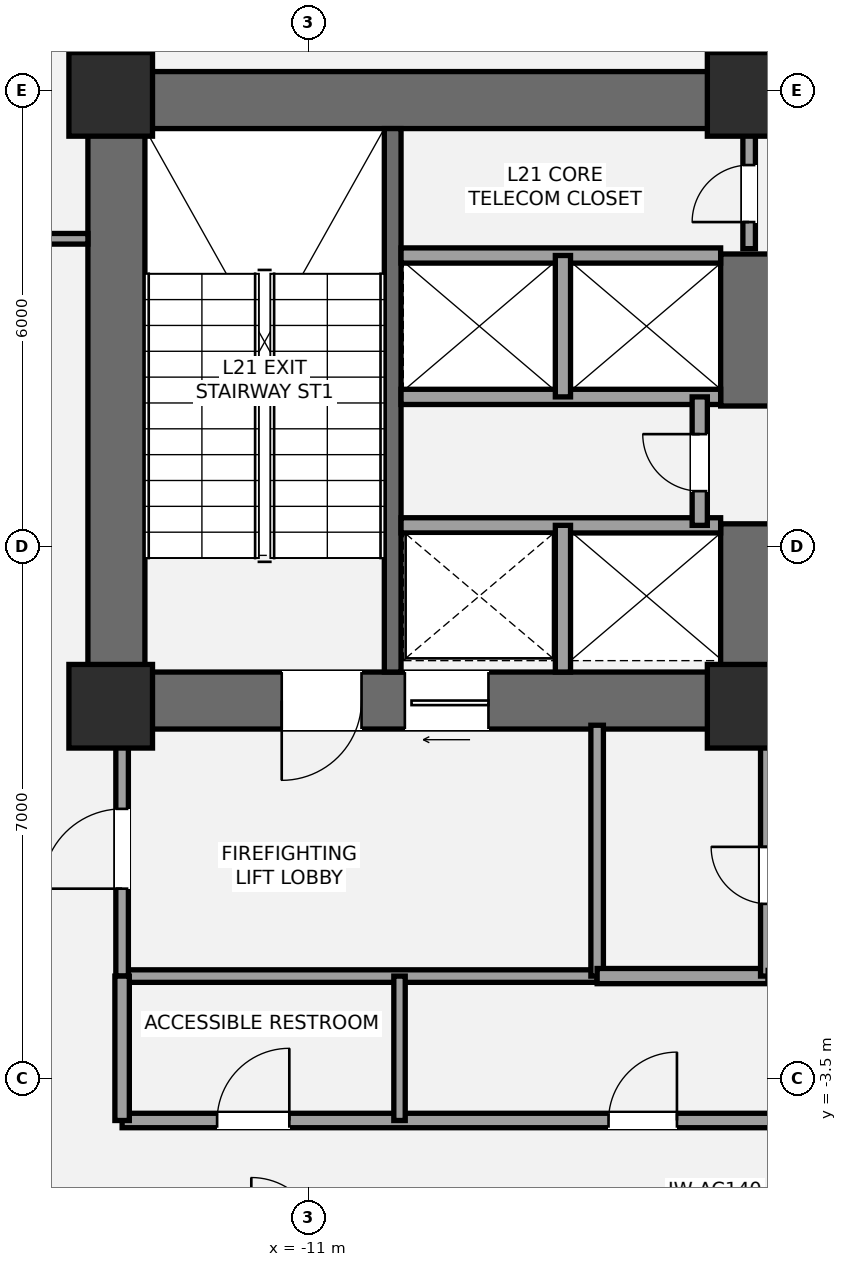
"""IFC4 building model, lengths in metres.
Left out: names, types, materials, properties, quantities, classifications, styles, units other than length and angle.
Written with IfcOpenShell. Run it as: python <this file> out.ifc"""

import sys

from ifc_helpers import new_model, si_unit, direction, frame, frame_2d, origin, origin_2d, place, context, subcontext, project, spatial, rectangle, extrude, element, fill, save


model = new_model("IFC4")
c1 = context("Model", 3, precision=1e-05, world=origin(), true_north=direction((0.0, 1.0)))
c2 = subcontext(c1, "Body", "Model", "MODEL_VIEW")
j1 = project(units=[si_unit("LENGTHUNIT", "METRE"), si_unit("PLANEANGLEUNIT", "RADIAN")], contexts=[c1])
p1 = place(None, origin())
s1 = spatial("IfcSite", under=j1, at=p1, CompositionType="ELEMENT")
p2 = place(p1, origin())
s2 = spatial("IfcBuilding", under=s1, at=p2, CompositionType="ELEMENT")
p3 = place(p2, frame((0.0, 0.0, 81.9)))
s3 = spatial("IfcBuildingStorey", under=s2, at=p3, CompositionType="ELEMENT", Elevation=81.9)
p4 = place(p3, frame((-13.525, 1.1, 0.0), z_axis=(0.0, 0.0, 1.0), x_axis=(0.0, 1.0, 0.0)))
e1 = element("IfcWall", 1, at=p4, inside=s3, PredefinedType="SHEAR", context=c2, shape_type="SweptSolid", body=[
    extrude(rectangle(XDim=8.65, YDim=0.75, at=frame_2d((4.325, 0.0))), origin(), (0.0, 0.0, 1.0), 4.2),
])
p5 = place(p3, frame((-13.9, 9.375, 0.0), z_axis=(0.0, 0.0, 1.0), x_axis=(1.0, 0.0, 0.0)))
e2 = element("IfcWall", 2, at=p5, inside=s3, PredefinedType="SHEAR", context=c2, shape_type="SweptSolid", body=[
    extrude(rectangle(XDim=9.475, YDim=0.75, at=frame_2d((4.737, 0.0))), origin(), (0.0, 0.0, 1.0), 4.2),
])
p6 = place(p3, frame((-4.825, 1.475, 0.0), z_axis=(0.0, 0.0, 1.0), x_axis=(-1.0, 0.0, 0.0)))
e3 = element("IfcWall", 3, at=p6, inside=s3, PredefinedType="SHEAR", context=c2, shape_type="SweptSolid", body=[
    extrude(rectangle(XDim=9.075, YDim=0.75, at=frame_2d((4.538, 0.0))), origin(), (0.0, 0.0, 1.0), 4.2),
])
p7 = place(p6, frame((5.475, 0.0, 0.0)))
e4 = element("IfcOpeningElement", 4, at=p7, cuts=e3, PredefinedType="OPENING", context=c2, shape_type="SweptSolid", body=[
    extrude(rectangle(XDim=1.05, YDim=2.15, at=frame_2d((0.525, 1.075))), frame((0.0, 0.385, 0.0), z_axis=(0.0, -1.0, 0.0), x_axis=(1.0, 0.0, 0.0)), (0.0, 0.0, 1.0), 0.77),
])
p8 = place(p6, frame((3.805, 0.0, 0.0)))
e5 = element("IfcOpeningElement", 5, at=p8, cuts=e3, PredefinedType="OPENING", context=c2, shape_type="SweptSolid", body=[
    extrude(rectangle(XDim=1.1, YDim=2.2, at=frame_2d((0.55, 1.1))), frame((0.0, 0.385, 0.0), z_axis=(0.0, -1.0, 0.0), x_axis=(1.0, 0.0, 0.0)), (0.0, 0.0, 1.0), 0.77),
])
p9 = place(p3, frame((-5.2, 1.1, 0.0), z_axis=(0.0, 0.0, 1.0), x_axis=(0.0, 1.0, 0.0)))
e6 = element("IfcWall", 6, at=p9, inside=s3, PredefinedType="SHEAR", context=c2, shape_type="SweptSolid", body=[
    extrude(rectangle(XDim=2.7, YDim=0.75, at=frame_2d((1.35, 0.0))), origin(), (0.0, 0.0, 1.0), 4.2),
])
p10 = place(p3, frame((-5.2, 5.35, 0.0), z_axis=(0.0, 0.0, 1.0), x_axis=(0.0, 1.0, 0.0)))
e7 = element("IfcWall", 7, at=p10, inside=s3, PredefinedType="SHEAR", context=c2, shape_type="SweptSolid", body=[
    extrude(rectangle(XDim=2.0, YDim=0.75, at=frame_2d((1.0, 0.0))), origin(), (0.0, 0.0, 1.0), 4.2),
])
p11 = place(p3, frame((-9.89, 1.85, 0.0), z_axis=(0.0, 0.0, 1.0), x_axis=(0.0, 1.0, 0.0)))
e8 = element("IfcWall", 8, at=p11, inside=s3, PredefinedType="SHEAR", context=c2, shape_type="SweptSolid", body=[
    extrude(rectangle(XDim=7.15, YDim=0.22, at=frame_2d((3.575, 0.0))), origin(), (0.0, 0.0, 1.0), 4.2),
])
p12 = place(p3, frame((-4.8, 9.0, 0.0), z_axis=(0.0, 0.0, 1.0), x_axis=(0.0, 1.0, 0.0)))
e9 = element("IfcWall", 9, at=p12, inside=s3, PredefinedType="SHEAR", context=c2, shape_type="SweptSolid", body=[
    extrude(rectangle(XDim=4.15, YDim=0.75, at=frame_2d((2.075, 0.0))), origin(), (0.0, 0.0, 1.0), 4.2),
])
for number, where, z_axis, x_axis in (
    (10, (-13.6, 1.4, 0.0), (0.0, 0.0, 1.0), (1.0, 0.0, 0.0)),
    (11, (-13.6, 9.45, 0.0), (0.0, 0.0, 1.0), (1.0, 0.0, 0.0)),
    (12, (-5.2, 1.4, 0.0), (0.0, 0.0, 1.0), (1.0, 0.0, 0.0)),
    (13, (-5.2, 9.45, 0.0), (0.0, 0.0, 1.0), (1.0, 0.0, 0.0)),
):
    element("IfcColumn", number, at=place(p3, frame(where, z_axis=z_axis, x_axis=x_axis)), inside=s3, PredefinedType="COLUMN", context=c2, shape_type="SweptSolid", body=[
        extrude(rectangle(XDim=1.1, YDim=1.1, at=origin_2d()), origin(), (0.0, 0.0, 1.0), 4.2),
    ])
p13 = place(p3, frame((-13.45, -2.15, 0.0), z_axis=(0.0, 0.0, 1.0), x_axis=(1.0, 0.0, 0.0)))
e14 = element("IfcWall", 14, at=p13, inside=s3, PredefinedType="PARTITIONING", context=c2, shape_type="SweptSolid", body=[
    extrude(rectangle(XDim=6.25, YDim=0.165, at=frame_2d((3.125, 0.0))), origin(), (0.0, 0.0, 1.0), 4.01),
])
p14 = place(p3, frame((-13.45, -2.15, 0.0), z_axis=(0.0, 0.0, 1.0), x_axis=(0.0, 1.0, 0.0)))
e15 = element("IfcWall", 15, at=p14, inside=s3, PredefinedType="PARTITIONING", context=c2, shape_type="SweptSolid", body=[
    extrude(rectangle(XDim=3.3, YDim=0.165, at=frame_2d((1.65, 0.0))), origin(), (0.0, 0.0, 1.0), 4.01),
])
p15 = place(p14, frame((1.15, 0.0, 0.0)))
e16 = element("IfcOpeningElement", 16, at=p15, cuts=e15, PredefinedType="OPENING", context=c2, shape_type="SweptSolid", body=[
    extrude(rectangle(XDim=1.05, YDim=2.15, at=frame_2d((0.525, 1.075))), frame((0.0, 0.093, 0.0), z_axis=(0.0, -1.0, 0.0), x_axis=(1.0, 0.0, 0.0)), (0.0, 0.0, 1.0), 0.185),
])
p16 = place(p3, frame((-7.2, -2.15, 0.0), z_axis=(0.0, 0.0, 1.0), x_axis=(0.0, 1.0, 0.0)))
e17 = element("IfcWall", 17, at=p16, inside=s3, PredefinedType="PARTITIONING", context=c2, shape_type="SweptSolid", body=[
    extrude(rectangle(XDim=3.3, YDim=0.165, at=frame_2d((1.65, 0.0))), origin(), (0.0, 0.0, 1.0), 3.463),
])
p17 = place(p3, frame((-7.2, -2.15, 0.0), z_axis=(0.0, 0.0, 1.0), x_axis=(1.0, 0.0, 0.0)))
e18 = element("IfcWall", 18, at=p17, inside=s3, PredefinedType="SOLIDWALL", context=c2, shape_type="SweptSolid", body=[
    extrude(rectangle(XDim=2.25, YDim=0.2, at=frame_2d((1.125, 0.0))), origin(), (0.0, 0.0, 1.0), 4.01),
])
p18 = place(p3, frame((-4.95, -2.15, 0.0), z_axis=(0.0, 0.0, 1.0), x_axis=(0.0, 1.0, 0.0)))
e19 = element("IfcWall", 19, at=p18, inside=s3, PredefinedType="SOLIDWALL", context=c2, shape_type="SweptSolid", body=[
    extrude(rectangle(XDim=3.3, YDim=0.2, at=frame_2d((1.65, 0.0))), origin(), (0.0, 0.0, 1.0), 4.01),
])
p19 = place(p18, frame((0.95, 0.0, 0.0)))
e20 = element("IfcOpeningElement", 20, at=p19, cuts=e19, PredefinedType="OPENING", context=c2, shape_type="SweptSolid", body=[
    extrude(rectangle(XDim=0.75, YDim=2.1, at=frame_2d((0.375, 1.05))), frame((0.0, 0.11, 0.0), z_axis=(0.0, -1.0, 0.0), x_axis=(1.0, 0.0, 0.0)), (0.0, 0.0, 1.0), 0.22),
])
p20 = place(p3, frame((-9.78, 3.78, 0.0), z_axis=(0.0, 0.0, 1.0), x_axis=(1.0, 0.0, 0.0)))
e21 = element("IfcWall", 21, at=p20, inside=s3, PredefinedType="SOLIDWALL", context=c2, shape_type="SweptSolid", body=[
    extrude(rectangle(XDim=4.205, YDim=0.2, at=frame_2d((2.103, 0.0))), origin(), (0.0, 0.0, 1.0), 4.01),
])
p21 = place(p3, frame((-7.65, 1.85, 0.0), z_axis=(0.0, 0.0, 1.0), x_axis=(0.0, 1.0, 0.0)))
e22 = element("IfcWall", 22, at=p21, inside=s3, PredefinedType="SOLIDWALL", context=c2, shape_type="SweptSolid", body=[
    extrude(rectangle(XDim=1.93, YDim=0.2, at=frame_2d((0.965, 0.0))), origin(), (0.0, 0.0, 1.0), 4.01),
])
for number, where, z_axis, x_axis in (
    (23, (-9.78, 5.47, 0.0), (0.0, 0.0, 1.0), (1.0, 0.0, 0.0)),
    (24, (-9.78, 7.33, 0.0), (0.0, 0.0, 1.0), (1.0, 0.0, 0.0)),
):
    element("IfcWall", number, at=place(p3, frame(where, z_axis=z_axis, x_axis=x_axis)), inside=s3, PredefinedType="SOLIDWALL", context=c2, shape_type="SweptSolid", body=[
        extrude(rectangle(XDim=4.205, YDim=0.2, at=frame_2d((2.103, 0.0))), origin(), (0.0, 0.0, 1.0), 4.01),
    ])
p22 = place(p3, frame((-7.65, 5.47, 0.0), z_axis=(0.0, 0.0, 1.0), x_axis=(0.0, 1.0, 0.0)))
e25 = element("IfcWall", 25, at=p22, inside=s3, PredefinedType="SOLIDWALL", context=c2, shape_type="SweptSolid", body=[
    extrude(rectangle(XDim=1.86, YDim=0.2, at=frame_2d((0.93, 0.0))), origin(), (0.0, 0.0, 1.0), 4.01),
])
p23 = place(p3, frame((-5.85, 3.78, 0.0), z_axis=(0.0, 0.0, 1.0), x_axis=(0.0, 1.0, 0.0)))
e26 = element("IfcWall", 26, at=p23, inside=s3, PredefinedType="SOLIDWALL", context=c2, shape_type="SweptSolid", body=[
    extrude(rectangle(XDim=1.69, YDim=0.2, at=frame_2d((0.845, 0.0))), origin(), (0.0, 0.0, 1.0), 4.01),
])
p24 = place(p23, frame((0.45, 0.0, 0.0)))
e27 = element("IfcOpeningElement", 27, at=p24, cuts=e26, PredefinedType="OPENING", context=c2, shape_type="SweptSolid", body=[
    extrude(rectangle(XDim=0.75, YDim=2.1, at=frame_2d((0.375, 1.05))), frame((0.0, 0.11, 0.0), z_axis=(0.0, -1.0, 0.0), x_axis=(1.0, 0.0, 0.0)), (0.0, 0.0, 1.0), 0.22),
])
p25 = place(p3, frame((-5.2, 7.42, 0.0), z_axis=(0.0, 0.0, 1.0), x_axis=(0.0, 1.0, 0.0)))
e28 = element("IfcWall", 28, at=p25, inside=s3, PredefinedType="PARTITIONING", context=c2, shape_type="SweptSolid", body=[
    extrude(rectangle(XDim=1.58, YDim=0.165, at=frame_2d((0.79, 0.0))), origin(), (0.0, 0.0, 1.0), 4.01),
])
p26 = place(p25, frame((0.35, 0.0, 0.0)))
e29 = element("IfcOpeningElement", 29, at=p26, cuts=e28, PredefinedType="OPENING", context=c2, shape_type="SweptSolid", body=[
    extrude(rectangle(XDim=0.75, YDim=2.1, at=frame_2d((0.375, 1.05))), frame((0.0, 0.093, 0.0), z_axis=(0.0, -1.0, 0.0), x_axis=(1.0, 0.0, 0.0)), (0.0, 0.0, 1.0), 0.185),
])
p27 = place(p3, frame((-13.45, -4.05, 0.0), z_axis=(0.0, 0.0, 1.0), x_axis=(1.0, 0.0, 0.0)))
e30 = element("IfcWall", 30, at=p27, inside=s3, PredefinedType="PLUMBINGWALL", context=c2, shape_type="SweptSolid", body=[
    extrude(rectangle(XDim=11.35, YDim=0.19, at=frame_2d((5.675, 0.0))), origin(), (0.0, 0.0, 1.0), 3.463),
])
p28 = place(p27, frame((1.25, 0.0, 0.0)))
e31 = element("IfcOpeningElement", 31, at=p28, cuts=e30, PredefinedType="OPENING", context=c2, shape_type="SweptSolid", body=[
    extrude(rectangle(XDim=0.95, YDim=2.15, at=frame_2d((0.475, 1.075))), frame((0.0, 0.105, 0.0), z_axis=(0.0, -1.0, 0.0), x_axis=(1.0, 0.0, 0.0)), (0.0, 0.0, 1.0), 0.21),
])
p29 = place(p27, frame((6.4, 0.0, 0.0)))
e32 = element("IfcOpeningElement", 32, at=p29, cuts=e30, PredefinedType="OPENING", context=c2, shape_type="SweptSolid", body=[
    extrude(rectangle(XDim=0.9, YDim=2.1, at=frame_2d((0.45, 1.05))), frame((0.0, 0.105, 0.0), z_axis=(0.0, -1.0, 0.0), x_axis=(1.0, 0.0, 0.0)), (0.0, 0.0, 1.0), 0.21),
])
p30 = place(p3, frame((-13.45, -4.05, 0.0), z_axis=(0.0, 0.0, 1.0), x_axis=(0.0, 1.0, 0.0)))
e33 = element("IfcWall", 33, at=p30, inside=s3, PredefinedType="PLUMBINGWALL", context=c2, shape_type="SweptSolid", body=[
    extrude(rectangle(XDim=1.9, YDim=0.19, at=frame_2d((0.95, 0.0))), origin(), (0.0, 0.0, 1.0), 4.01),
])
p31 = place(p3, frame((-9.8, -4.05, 0.0), z_axis=(0.0, 0.0, 1.0), x_axis=(0.0, 1.0, 0.0)))
e34 = element("IfcWall", 34, at=p31, inside=s3, PredefinedType="PLUMBINGWALL", context=c2, shape_type="SweptSolid", body=[
    extrude(rectangle(XDim=1.9, YDim=0.15, at=frame_2d((0.95, 0.0))), origin(), (0.0, 0.0, 1.0), 4.01),
])
p32 = place(p3, frame((-21.281, 7.55, 0.0), z_axis=(0.0, 0.0, 1.0), x_axis=(1.0, 0.0, 0.0)))
e35 = element("IfcWall", 35, at=p32, inside=s3, PredefinedType="PARTITIONING", context=c2, shape_type="SweptSolid", body=[
    extrude(rectangle(XDim=7.381, YDim=0.14, at=frame_2d((3.69, 0.0))), origin(), (0.0, 0.0, 1.0), 3.463),
])
p33 = place(p32, frame((1.89, 0.0, 0.0)))
e36 = element("IfcOpeningElement", 36, at=p33, cuts=e35, PredefinedType="OPENING", context=c2, shape_type="SweptSolid", body=[
    extrude(rectangle(XDim=0.92, YDim=2.15, at=frame_2d((0.46, 1.075))), frame((0.0, 0.08, 0.0), z_axis=(0.0, -1.0, 0.0), x_axis=(1.0, 0.0, 0.0)), (0.0, 0.0, 1.0), 0.16),
])
p34 = place(p7, origin())
e37 = element("IfcDoor", 37, at=p34, inside=s3, OperationType="SINGLE_SWING_RIGHT", PredefinedType="DOOR", context=c2, shape_type="SweptSolid", body=[
    extrude(rectangle(XDim=1.05, YDim=2.15, at=frame_2d((0.525, 1.075))), frame((0.0, 0.025, 0.0), z_axis=(0.0, -1.0, 0.0), x_axis=(1.0, 0.0, 0.0)), (0.0, 0.0, 1.0), 0.05),
])
fill(e4, e37)
p35 = place(p15, origin())
e38 = element("IfcDoor", 38, at=p35, inside=s3, OperationType="SINGLE_SWING_LEFT", PredefinedType="DOOR", context=c2, shape_type="SweptSolid", body=[
    extrude(rectangle(XDim=1.05, YDim=2.15, at=frame_2d((0.525, 1.075))), frame((0.0, 0.025, 0.0), z_axis=(0.0, -1.0, 0.0), x_axis=(1.0, 0.0, 0.0)), (0.0, 0.0, 1.0), 0.05),
])
fill(e16, e38)
p36 = place(p19, origin())
e39 = element("IfcDoor", 39, at=p36, inside=s3, OperationType="SINGLE_SWING_RIGHT", PredefinedType="DOOR", context=c2, shape_type="SweptSolid", body=[
    extrude(rectangle(XDim=0.75, YDim=2.1, at=frame_2d((0.375, 1.05))), frame((0.0, 0.025, 0.0), z_axis=(0.0, -1.0, 0.0), x_axis=(1.0, 0.0, 0.0)), (0.0, 0.0, 1.0), 0.05),
])
fill(e20, e39)
p37 = place(p8, origin())
e40 = element("IfcDoor", 40, at=p37, inside=s3, OperationType="SLIDING_TO_LEFT", PredefinedType="DOOR", context=c2, shape_type="SweptSolid", body=[
    extrude(rectangle(XDim=1.1, YDim=2.2, at=frame_2d((0.55, 1.1))), frame((0.0, 0.025, 0.0), z_axis=(0.0, -1.0, 0.0), x_axis=(1.0, 0.0, 0.0)), (0.0, 0.0, 1.0), 0.05),
])
fill(e5, e40)
p38 = place(p24, origin())
e41 = element("IfcDoor", 41, at=p38, inside=s3, OperationType="SINGLE_SWING_RIGHT", PredefinedType="DOOR", context=c2, shape_type="SweptSolid", body=[
    extrude(rectangle(XDim=0.75, YDim=2.1, at=frame_2d((0.375, 1.05))), frame((0.0, 0.025, 0.0), z_axis=(0.0, -1.0, 0.0), x_axis=(1.0, 0.0, 0.0)), (0.0, 0.0, 1.0), 0.05),
])
fill(e27, e41)
p39 = place(p26, origin())
e42 = element("IfcDoor", 42, at=p39, inside=s3, OperationType="SINGLE_SWING_LEFT", PredefinedType="DOOR", context=c2, shape_type="SweptSolid", body=[
    extrude(rectangle(XDim=0.75, YDim=2.1, at=frame_2d((0.375, 1.05))), frame((0.0, 0.025, 0.0), z_axis=(0.0, -1.0, 0.0), x_axis=(1.0, 0.0, 0.0)), (0.0, 0.0, 1.0), 0.05),
])
fill(e29, e42)
p40 = place(p28, origin())
e43 = element("IfcDoor", 43, at=p40, inside=s3, OperationType="SINGLE_SWING_RIGHT", PredefinedType="DOOR", context=c2, shape_type="SweptSolid", body=[
    extrude(rectangle(XDim=0.95, YDim=2.15, at=frame_2d((0.475, 1.075))), frame((0.0, 0.025, 0.0), z_axis=(0.0, -1.0, 0.0), x_axis=(1.0, 0.0, 0.0)), (0.0, 0.0, 1.0), 0.05),
])
fill(e31, e43)
p41 = place(p29, origin())
e44 = element("IfcDoor", 44, at=p41, inside=s3, OperationType="SINGLE_SWING_RIGHT", PredefinedType="DOOR", context=c2, shape_type="SweptSolid", body=[
    extrude(rectangle(XDim=0.9, YDim=2.1, at=frame_2d((0.45, 1.05))), frame((0.0, 0.025, 0.0), z_axis=(0.0, -1.0, 0.0), x_axis=(1.0, 0.0, 0.0)), (0.0, 0.0, 1.0), 0.05),
])
fill(e32, e44)
save(model, sys.argv[1])
